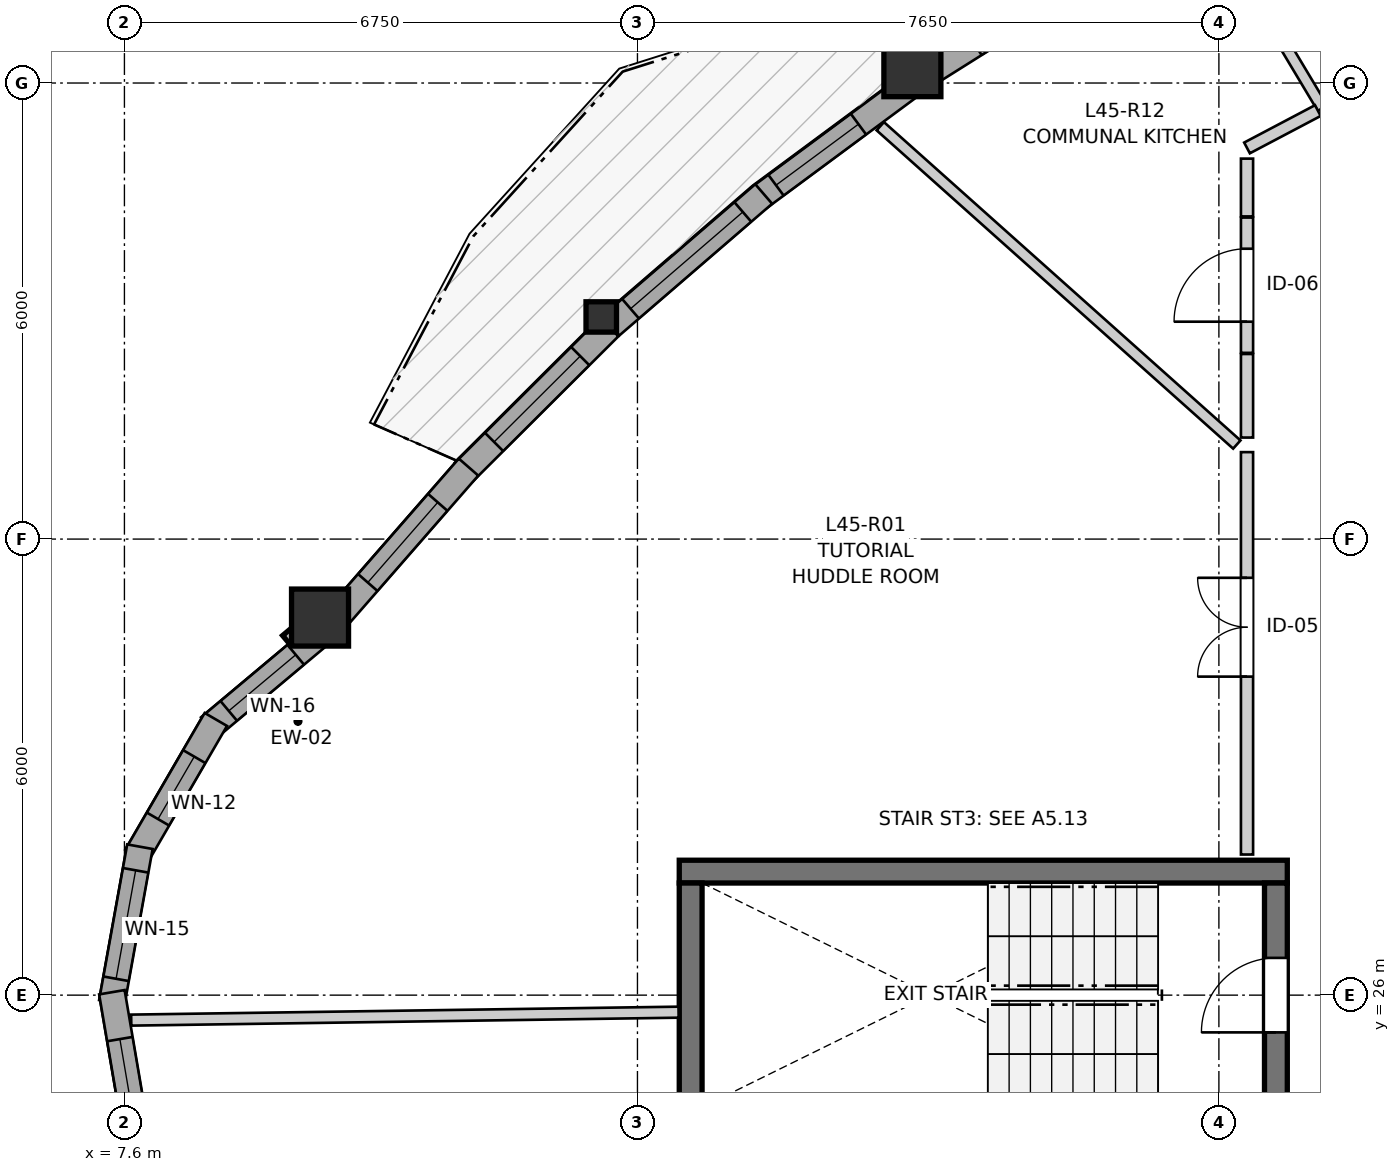
"""IFC4 building model, lengths in metres.
Left out: names, types, materials, properties, quantities, classifications, styles, units other than length and angle.
Written with IfcOpenShell. Run it as: python <this file> out.ifc"""

import sys

from ifc_helpers import new_model, si_unit, direction, frame, frame_2d, origin, origin_2d, place, context, subcontext, project, spatial, rectangle, i_section, extrude, source, transform, mapped, element, fill, save


model = new_model("IFC4")
c1 = context("Model", 3, precision=1e-05, world=origin(), true_north=direction((0.0, 1.0)))
c2 = subcontext(c1, "Body", "Model", "MODEL_VIEW")
j1 = project(units=[si_unit("LENGTHUNIT", "METRE"), si_unit("PLANEANGLEUNIT", "RADIAN")], contexts=[c1])
p1 = place(None, origin())
s1 = spatial("IfcSite", under=j1, at=p1, CompositionType="ELEMENT")
p2 = place(p1, origin())
s2 = spatial("IfcBuilding", under=s1, at=p2, CompositionType="ELEMENT")
p3 = place(p2, frame((0.0, 0.0, 152.2)))
s3 = spatial("IfcBuildingStorey", under=s2, at=p3, CompositionType="ELEMENT", Elevation=152.2)
p4 = place(p3, frame((22.9, 27.625, 0.0), z_axis=(0.0, 0.0, 1.0), x_axis=(-1.0, 0.0, 0.0)))
e1 = element("IfcWall", 1, at=p4, inside=s3, PredefinedType="SHEAR", context=c2, shape_type="SweptSolid", body=[
    extrude(rectangle(XDim=8.0, YDim=0.3, at=frame_2d((4.0, 0.0))), origin(), (0.0, 0.0, 1.0), 2.935),
])
p5 = place(p3, frame((15.05, 27.475, 0.0), z_axis=(0.0, 0.0, 1.0), x_axis=(0.0, -1.0, 0.0)))
e2 = element("IfcWall", 2, at=p5, inside=s3, PredefinedType="SHEAR", context=c2, shape_type="SweptSolid", body=[
    extrude(rectangle(XDim=2.95, YDim=0.3, at=frame_2d((1.475, 0.0))), origin(), (0.0, 0.0, 1.0), 2.935),
])
p6 = place(p3, frame((22.75, 24.525, 0.0), z_axis=(0.0, 0.0, 1.0), x_axis=(0.0, 1.0, 0.0)))
e3 = element("IfcWall", 3, at=p6, inside=s3, PredefinedType="SHEAR", context=c2, shape_type="SweptSolid", body=[
    extrude(rectangle(XDim=2.95, YDim=0.3, at=frame_2d((1.475, 0.0))), origin(), (0.0, 0.0, 1.0), 2.935),
])
p7 = place(p6, frame((0.985, 0.0, 0.0)))
e4 = element("IfcOpeningElement", 4, at=p7, cuts=e3, PredefinedType="OPENING", context=c2, shape_type="SweptSolid", body=[
    extrude(rectangle(XDim=0.98, YDim=2.15, at=frame_2d((0.49, 1.075))), frame((0.0, 0.16, 0.0), z_axis=(0.0, -1.0, 0.0), x_axis=(1.0, 0.0, 0.0)), (0.0, 0.0, 1.0), 0.32),
])
m1 = source(origin(), c2, "Body", "SweptSolid", [
    extrude(rectangle(XDim=0.75, YDim=0.75, at=origin_2d()), origin(), (0.0, 0.0, 1.0), 2.935),
])
for number, where, z_axis, x_axis in (
    (5, (10.174, 30.967, 0.0), (0.0, 0.0, 1.0), (1.0, 0.0, 0.0)),
    (6, (17.967, 38.195, 0.0), (0.0, 0.0, 1.0), (1.0, 0.0, 0.0)),
):
    element("IfcColumn", number, at=place(p3, frame(where, z_axis=z_axis, x_axis=x_axis)), inside=s3, PredefinedType="COLUMN", context=c2, shape_type="MappedRepresentation", body=[
        mapped(m1, transform((0.0, 0.0, 0.0), x_axis=(1.0, 0.0, 0.0), y_axis=(0.0, 1.0, 0.0), z_axis=(0.0, 0.0, 1.0), scale=1.0)),
    ])
m2 = source(origin(), c2, "Body", "SweptSolid", [
    extrude(i_section(OverallWidth=0.401, OverallDepth=0.399, WebThickness=0.023, FlangeThickness=0.036, FilletRadius=0.015, at=origin_2d()), origin(), (0.0, 0.0, 1.0), 2.935),
])
p8 = place(p3, frame((13.874, 34.922, 0.0), z_axis=(0.0, 0.0, 1.0), x_axis=(1.0, 0.0, 0.0)))
e7 = element("IfcColumn", 7, at=p8, inside=s3, PredefinedType="PILASTER", context=c2, shape_type="MappedRepresentation", body=[
    mapped(m2, transform((0.0, 0.0, 0.0), x_axis=(1.0, 0.0, 0.0), y_axis=(0.0, 1.0, 0.0), z_axis=(0.0, 0.0, 1.0), scale=1.0)),
])
p9 = place(p3, frame((10.164, 30.738, 0.0), z_axis=(0.0, 0.0, 1.0), x_axis=(-0.766501557267, -0.64224244854, 0.0)))
e8 = element("IfcWall", 8, at=p9, inside=s3, PredefinedType="SOLIDWALL", context=c2, shape_type="SweptSolid", body=[
    extrude(rectangle(XDim=1.888, YDim=0.34, at=frame_2d((0.944, 0.0))), origin(), (0.0, 0.0, 1.0), 2.515),
])
p10 = place(p9, frame((0.404, 0.0, 0.82)))
e9 = element("IfcOpeningElement", 9, at=p10, cuts=e8, PredefinedType="OPENING", context=c2, shape_type="SweptSolid", body=[
    extrude(rectangle(XDim=1.15, YDim=1.2, at=frame_2d((0.575, 0.6))), frame((0.0, 0.18, 0.0), z_axis=(0.0, -1.0, 0.0), x_axis=(1.0, 0.0, 0.0)), (0.0, 0.0, 1.0), 0.36),
])
p11 = place(p3, frame((8.803, 29.627, 0.0), z_axis=(0.0, 0.0, 1.0), x_axis=(-0.502090235641, -0.864815237651, 0.0)))
e10 = element("IfcWall", 10, at=p11, inside=s3, PredefinedType="SOLIDWALL", context=c2, shape_type="SweptSolid", body=[
    extrude(rectangle(XDim=2.081, YDim=0.34, at=frame_2d((1.041, 0.0))), origin(), (0.0, 0.0, 1.0), 2.515),
])
p12 = place(p11, frame((0.565, 0.0, 0.82)))
e11 = element("IfcOpeningElement", 11, at=p12, cuts=e10, PredefinedType="OPENING", context=c2, shape_type="SweptSolid", body=[
    extrude(rectangle(XDim=0.95, YDim=1.35, at=frame_2d((0.475, 0.675))), frame((0.0, 0.18, 0.0), z_axis=(0.0, -1.0, 0.0), x_axis=(1.0, 0.0, 0.0)), (0.0, 0.0, 1.0), 0.36),
])
p13 = place(p3, frame((7.804, 27.953, 0.0), z_axis=(0.0, 0.0, 1.0), x_axis=(-0.177605215389, -0.984101817632, 0.0)))
e12 = element("IfcWall", 12, at=p13, inside=s3, PredefinedType="SOLIDWALL", context=c2, shape_type="SweptSolid", body=[
    extrude(rectangle(XDim=2.081, YDim=0.34, at=frame_2d((1.041, 0.0))), origin(), (0.0, 0.0, 1.0), 2.515),
])
p14 = place(p13, frame((0.316, 0.0, 0.82)))
e13 = element("IfcOpeningElement", 13, at=p14, cuts=e12, PredefinedType="OPENING", context=c2, shape_type="SweptSolid", body=[
    extrude(rectangle(XDim=1.45, YDim=1.25, at=frame_2d((0.725, 0.625))), frame((0.0, 0.18, 0.0), z_axis=(0.0, -1.0, 0.0), x_axis=(1.0, 0.0, 0.0)), (0.0, 0.0, 1.0), 0.36),
])
p15 = place(p3, frame((7.435, 26.038, 0.0), z_axis=(0.0, 0.0, 1.0), x_axis=(0.168107405166, -0.985768685001, 0.0)))
e14 = element("IfcWall", 14, at=p15, inside=s3, PredefinedType="SOLIDWALL", context=c2, shape_type="SweptSolid", body=[
    extrude(rectangle(XDim=2.081, YDim=0.34, at=frame_2d((1.041, 0.0))), origin(), (0.0, 0.0, 1.0), 2.515),
])
p16 = place(p15, frame((0.625, 0.0, 0.82)))
e15 = element("IfcOpeningElement", 15, at=p16, cuts=e14, PredefinedType="OPENING", context=c2, shape_type="SweptSolid", body=[
    extrude(rectangle(XDim=1.15, YDim=1.2, at=frame_2d((0.575, 0.6))), frame((0.0, 0.18, 0.0), z_axis=(0.0, -1.0, 0.0), x_axis=(1.0, 0.0, 0.0)), (0.0, 0.0, 1.0), 0.36),
])
p17 = place(p3, frame((20.284, 39.452, 0.0), z_axis=(0.0, 0.0, 1.0), x_axis=(-0.846415587119, -0.532522913951, 0.0)))
e16 = element("IfcWall", 16, at=p17, inside=s3, PredefinedType="SOLIDWALL", context=c2, shape_type="SweptSolid", body=[
    extrude(rectangle(XDim=2.476, YDim=0.34, at=frame_2d((1.238, 0.0))), origin(), (0.0, 0.0, 1.0), 2.515),
])
p18 = place(p17, frame((0.718, 0.0, 0.82)))
e17 = element("IfcOpeningElement", 17, at=p18, cuts=e16, PredefinedType="OPENING", context=c2, shape_type="SweptSolid", body=[
    extrude(rectangle(XDim=1.05, YDim=1.45, at=frame_2d((0.525, 0.725))), frame((0.0, 0.18, 0.0), z_axis=(0.0, -1.0, 0.0), x_axis=(1.0, 0.0, 0.0)), (0.0, 0.0, 1.0), 0.36),
])
p19 = place(p3, frame((17.944, 37.967, 0.0), z_axis=(0.0, 0.0, 1.0), x_axis=(-0.803795025682, -0.594906342788, 0.0)))
e18 = element("IfcWall", 18, at=p19, inside=s3, PredefinedType="SOLIDWALL", context=c2, shape_type="SweptSolid", body=[
    extrude(rectangle(XDim=2.491, YDim=0.34, at=frame_2d((1.245, 0.0))), origin(), (0.0, 0.0, 1.0), 2.515),
])
p20 = place(p19, frame((0.853, 0.0, 0.82)))
e19 = element("IfcOpeningElement", 19, at=p20, cuts=e18, PredefinedType="OPENING", context=c2, shape_type="SweptSolid", body=[
    extrude(rectangle(XDim=1.35, YDim=1.45, at=frame_2d((0.675, 0.725))), frame((0.0, 0.18, 0.0), z_axis=(0.0, -1.0, 0.0), x_axis=(1.0, 0.0, 0.0)), (0.0, 0.0, 1.0), 0.36),
])
p21 = place(p3, frame((16.011, 36.54, 0.0), z_axis=(0.0, 0.0, 1.0), x_axis=(-0.757442887734, -0.652901425807, 0.0)))
e20 = element("IfcWall", 20, at=p21, inside=s3, PredefinedType="SOLIDWALL", context=c2, shape_type="SweptSolid", body=[
    extrude(rectangle(XDim=2.655, YDim=0.34, at=frame_2d((1.328, 0.0))), origin(), (0.0, 0.0, 1.0), 2.515),
])
p22 = place(p21, frame((0.363, 0.0, 0.82)))
e21 = element("IfcOpeningElement", 21, at=p22, cuts=e20, PredefinedType="OPENING", context=c2, shape_type="SweptSolid", body=[
    extrude(rectangle(XDim=1.95, YDim=1.4, at=frame_2d((0.975, 0.7))), frame((0.0, 0.18, 0.0), z_axis=(0.0, -1.0, 0.0), x_axis=(1.0, 0.0, 0.0)), (0.0, 0.0, 1.0), 0.36),
])
p23 = place(p3, frame((13.979, 34.788, 0.0), z_axis=(0.0, 0.0, 1.0), x_axis=(-0.708417113386, -0.705794016312, 0.0)))
e22 = element("IfcWall", 22, at=p23, inside=s3, PredefinedType="SOLIDWALL", context=c2, shape_type="SweptSolid", body=[
    extrude(rectangle(XDim=2.699, YDim=0.34, at=frame_2d((1.35, 0.0))), origin(), (0.0, 0.0, 1.0), 2.515),
])
p24 = place(p23, frame((0.54, 0.0, 0.82)))
e23 = element("IfcOpeningElement", 23, at=p24, cuts=e22, PredefinedType="OPENING", context=c2, shape_type="SweptSolid", body=[
    extrude(rectangle(XDim=1.6, YDim=1.35, at=frame_2d((0.8, 0.675))), frame((0.0, 0.18, 0.0), z_axis=(0.0, -1.0, 0.0), x_axis=(1.0, 0.0, 0.0)), (0.0, 0.0, 1.0), 0.36),
])
p25 = place(p3, frame((12.127, 32.947, 0.0), z_axis=(0.0, 0.0, 1.0), x_axis=(-0.657607305641, -0.753360890655, 0.0)))
e24 = element("IfcWall", 24, at=p25, inside=s3, PredefinedType="SOLIDWALL", context=c2, shape_type="SweptSolid", body=[
    extrude(rectangle(XDim=2.621, YDim=0.34, at=frame_2d((1.311, 0.0))), origin(), (0.0, 0.0, 1.0), 2.515),
])
p26 = place(p25, frame((0.615, 0.0, 0.82)))
e25 = element("IfcOpeningElement", 25, at=p26, cuts=e24, PredefinedType="OPENING", context=c2, shape_type="SweptSolid", body=[
    extrude(rectangle(XDim=1.4, YDim=1.35, at=frame_2d((0.7, 0.675))), frame((0.0, 0.18, 0.0), z_axis=(0.0, -1.0, 0.0), x_axis=(1.0, 0.0, 0.0)), (0.0, 0.0, 1.0), 0.36),
])
p27 = place(p3, frame((22.37, 27.85, 0.0), z_axis=(0.0, 0.0, 1.0), x_axis=(0.0, 1.0, 0.0)))
e26 = element("IfcWall", 26, at=p27, inside=s3, PredefinedType="PARTITIONING", context=c2, shape_type="SweptSolid", body=[
    extrude(rectangle(XDim=5.294, YDim=0.16, at=frame_2d((2.647, 0.0))), origin(), (0.0, 0.0, 1.0), 2.935),
])
p28 = place(p27, frame((2.341, 0.0, 0.0)))
e27 = element("IfcOpeningElement", 27, at=p28, cuts=e26, PredefinedType="OPENING", context=c2, shape_type="SweptSolid", body=[
    extrude(rectangle(XDim=1.3, YDim=2.1, at=frame_2d((0.65, 1.05))), frame((0.0, 0.09, 0.0), z_axis=(0.0, -1.0, 0.0), x_axis=(1.0, 0.0, 0.0)), (0.0, 0.0, 1.0), 0.18),
])
p29 = place(p3, frame((22.37, 34.45, 0.0), z_axis=(0.0, 0.0, 1.0), x_axis=(0.0, 1.0, 0.0)))
e28 = element("IfcWall", 28, at=p29, inside=s3, PredefinedType="PARTITIONING", context=c2, shape_type="SweptSolid", body=[
    extrude(rectangle(XDim=1.78, YDim=0.16, at=frame_2d((0.89, 0.0))), origin(), (0.0, 0.0, 1.0), 2.935),
])
p30 = place(p29, frame((0.41, 0.0, 0.0)))
e29 = element("IfcOpeningElement", 29, at=p30, cuts=e28, PredefinedType="OPENING", context=c2, shape_type="SweptSolid", body=[
    extrude(rectangle(XDim=0.96, YDim=2.1, at=frame_2d((0.48, 1.05))), frame((0.0, 0.09, 0.0), z_axis=(0.0, -1.0, 0.0), x_axis=(1.0, 0.0, 0.0)), (0.0, 0.0, 1.0), 0.18),
])
p31 = place(p3, frame((7.689, 25.671, 0.0), z_axis=(0.0, 0.0, 1.0), x_axis=(0.999894747293, 0.014508422953, 0.0)))
e30 = element("IfcWall", 30, at=p31, inside=s3, PredefinedType="PARTITIONING", context=c2, shape_type="SweptSolid", body=[
    extrude(rectangle(XDim=7.202, YDim=0.145, at=frame_2d((3.601, 0.0))), origin(), (0.0, 0.0, 1.0), 2.935),
])
p32 = place(p3, frame((17.545, 37.432, 0.0), z_axis=(0.0, 0.0, 1.0), x_axis=(0.745965905636, -0.665984134668, 0.0)))
e31 = element("IfcWall", 31, at=p32, inside=s3, PredefinedType="PARTITIONING", context=c2, shape_type="SweptSolid", body=[
    extrude(rectangle(XDim=6.288, YDim=0.145, at=frame_2d((3.144, 0.0))), origin(), (0.0, 0.0, 1.0), 2.935),
])
p33 = place(p3, frame((21.908, 40.1, 0.0), z_axis=(0.0, 0.0, 1.0), x_axis=(0.513582752497, -0.85804006686, 0.0)))
e32 = element("IfcWall", 32, at=p33, inside=s3, PredefinedType="PARTITIONING", context=c2, shape_type="SweptSolid", body=[
    extrude(rectangle(XDim=2.832, YDim=0.145, at=frame_2d((1.416, 0.0))), origin(), (0.0, 0.0, 1.0), 2.935),
])
p34 = place(p3, frame((22.37, 33.336, 0.0), z_axis=(0.0, 0.0, 1.0), x_axis=(0.0, 1.0, 0.0)))
e33 = element("IfcWall", 33, at=p34, inside=s3, PredefinedType="PARTITIONING", context=c2, shape_type="SweptSolid", body=[
    extrude(rectangle(XDim=1.099, YDim=0.16, at=frame_2d((0.55, 0.0))), origin(), (0.0, 0.0, 1.0), 2.935),
])
p35 = place(p3, frame((22.37, 37.146, 0.0), z_axis=(0.0, 0.0, 1.0), x_axis=(0.884530854714, 0.46648168995, 0.0)))
e34 = element("IfcWall", 34, at=p35, inside=s3, PredefinedType="PARTITIONING", context=c2, shape_type="SweptSolid", body=[
    extrude(rectangle(XDim=1.053, YDim=0.16, at=frame_2d((0.527, 0.0))), origin(), (0.0, 0.0, 1.0), 2.543),
])
p36 = place(p3, frame((22.37, 36.245, 0.0), z_axis=(0.0, 0.0, 1.0), x_axis=(0.0, 1.0, 0.0)))
e35 = element("IfcWall", 35, at=p36, inside=s3, PredefinedType="PARTITIONING", context=c2, shape_type="SweptSolid", body=[
    extrude(rectangle(XDim=0.76, YDim=0.16, at=frame_2d((0.38, 0.0))), origin(), (0.0, 0.0, 1.0), 2.935),
])
m3 = source(origin(), c2, "Body", "SweptSolid", [
    extrude(rectangle(XDim=1.15, YDim=1.2, at=frame_2d((0.575, 0.6))), frame((0.0, 0.03, 0.0), z_axis=(0.0, -1.0, 0.0), x_axis=(1.0, 0.0, 0.0)), (0.0, 0.0, 1.0), 0.06),
])
p37 = place(p10, origin())
e36 = element("IfcWindow", 36, at=p37, inside=s3, PartitioningType="SINGLE_PANEL", PredefinedType="WINDOW", context=c2, shape_type="MappedRepresentation", body=[
    mapped(m3, transform((0.0, 0.0, 0.0), x_axis=(1.0, 0.0, 0.0), y_axis=(0.0, 1.0, 0.0), z_axis=(0.0, 0.0, 1.0), scale=1.0)),
])
fill(e9, e36)
m4 = source(origin(), c2, "Body", "SweptSolid", [
    extrude(rectangle(XDim=0.95, YDim=1.35, at=frame_2d((0.475, 0.675))), frame((0.0, 0.03, 0.0), z_axis=(0.0, -1.0, 0.0), x_axis=(1.0, 0.0, 0.0)), (0.0, 0.0, 1.0), 0.06),
])
p38 = place(p12, origin())
e37 = element("IfcWindow", 37, at=p38, inside=s3, PartitioningType="SINGLE_PANEL", PredefinedType="WINDOW", context=c2, shape_type="MappedRepresentation", body=[
    mapped(m4, transform((0.0, 0.0, 0.0), x_axis=(1.0, 0.0, 0.0), y_axis=(0.0, 1.0, 0.0), z_axis=(0.0, 0.0, 1.0), scale=1.0)),
])
fill(e11, e37)
m5 = source(origin(), c2, "Body", "SweptSolid", [
    extrude(rectangle(XDim=1.45, YDim=1.25, at=frame_2d((0.725, 0.625))), frame((0.0, 0.03, 0.0), z_axis=(0.0, -1.0, 0.0), x_axis=(1.0, 0.0, 0.0)), (0.0, 0.0, 1.0), 0.06),
])
p39 = place(p14, origin())
e38 = element("IfcWindow", 38, at=p39, inside=s3, PartitioningType="SINGLE_PANEL", PredefinedType="WINDOW", context=c2, shape_type="MappedRepresentation", body=[
    mapped(m5, transform((0.0, 0.0, 0.0), x_axis=(1.0, 0.0, 0.0), y_axis=(0.0, 1.0, 0.0), z_axis=(0.0, 0.0, 1.0), scale=1.0)),
])
fill(e13, e38)
p40 = place(p16, origin())
e39 = element("IfcWindow", 39, at=p40, inside=s3, PartitioningType="SINGLE_PANEL", PredefinedType="WINDOW", context=c2, shape_type="MappedRepresentation", body=[
    mapped(m3, transform((0.0, 0.0, 0.0), x_axis=(1.0, 0.0, 0.0), y_axis=(0.0, 1.0, 0.0), z_axis=(0.0, 0.0, 1.0), scale=1.0)),
])
fill(e15, e39)
m6 = source(origin(), c2, "Body", "SweptSolid", [
    extrude(rectangle(XDim=1.35, YDim=1.45, at=frame_2d((0.675, 0.725))), frame((0.0, 0.03, 0.0), z_axis=(0.0, -1.0, 0.0), x_axis=(1.0, 0.0, 0.0)), (0.0, 0.0, 1.0), 0.06),
])
p41 = place(p20, origin())
e40 = element("IfcWindow", 40, at=p41, inside=s3, PartitioningType="SINGLE_PANEL", PredefinedType="WINDOW", context=c2, shape_type="MappedRepresentation", body=[
    mapped(m6, transform((0.0, 0.0, 0.0), x_axis=(1.0, 0.0, 0.0), y_axis=(0.0, 1.0, 0.0), z_axis=(0.0, 0.0, 1.0), scale=1.0)),
])
fill(e19, e40)
m7 = source(origin(), c2, "Body", "SweptSolid", [
    extrude(rectangle(XDim=1.95, YDim=1.4, at=frame_2d((0.975, 0.7))), frame((0.0, 0.03, 0.0), z_axis=(0.0, -1.0, 0.0), x_axis=(1.0, 0.0, 0.0)), (0.0, 0.0, 1.0), 0.06),
])
p42 = place(p22, origin())
e41 = element("IfcWindow", 41, at=p42, inside=s3, PartitioningType="SINGLE_PANEL", PredefinedType="WINDOW", context=c2, shape_type="MappedRepresentation", body=[
    mapped(m7, transform((0.0, 0.0, 0.0), x_axis=(1.0, 0.0, 0.0), y_axis=(0.0, 1.0, 0.0), z_axis=(0.0, 0.0, 1.0), scale=1.0)),
])
fill(e21, e41)
m8 = source(origin(), c2, "Body", "SweptSolid", [
    extrude(rectangle(XDim=1.6, YDim=1.35, at=frame_2d((0.8, 0.675))), frame((0.0, 0.03, 0.0), z_axis=(0.0, -1.0, 0.0), x_axis=(1.0, 0.0, 0.0)), (0.0, 0.0, 1.0), 0.06),
])
p43 = place(p24, origin())
e42 = element("IfcWindow", 42, at=p43, inside=s3, PartitioningType="SINGLE_PANEL", PredefinedType="WINDOW", context=c2, shape_type="MappedRepresentation", body=[
    mapped(m8, transform((0.0, 0.0, 0.0), x_axis=(1.0, 0.0, 0.0), y_axis=(0.0, 1.0, 0.0), z_axis=(0.0, 0.0, 1.0), scale=1.0)),
])
fill(e23, e42)
m9 = source(origin(), c2, "Body", "SweptSolid", [
    extrude(rectangle(XDim=1.4, YDim=1.35, at=frame_2d((0.7, 0.675))), frame((0.0, 0.03, 0.0), z_axis=(0.0, -1.0, 0.0), x_axis=(1.0, 0.0, 0.0)), (0.0, 0.0, 1.0), 0.06),
])
p44 = place(p26, origin())
e43 = element("IfcWindow", 43, at=p44, inside=s3, PartitioningType="SINGLE_PANEL", PredefinedType="WINDOW", context=c2, shape_type="MappedRepresentation", body=[
    mapped(m9, transform((0.0, 0.0, 0.0), x_axis=(1.0, 0.0, 0.0), y_axis=(0.0, 1.0, 0.0), z_axis=(0.0, 0.0, 1.0), scale=1.0)),
])
fill(e25, e43)
m10 = source(origin(), c2, "Body", "SweptSolid", [
    extrude(rectangle(XDim=0.98, YDim=2.15, at=frame_2d((0.49, 1.075))), frame((0.0, 0.025, 0.0), z_axis=(0.0, -1.0, 0.0), x_axis=(1.0, 0.0, 0.0)), (0.0, 0.0, 1.0), 0.05),
])
p45 = place(p7, origin())
e44 = element("IfcDoor", 44, at=p45, inside=s3, OperationType="SINGLE_SWING_LEFT", PredefinedType="DOOR", context=c2, shape_type="MappedRepresentation", body=[
    mapped(m10, transform((0.0, 0.0, 0.0), x_axis=(1.0, 0.0, 0.0), y_axis=(0.0, 1.0, 0.0), z_axis=(0.0, 0.0, 1.0), scale=1.0)),
])
fill(e4, e44)
m11 = source(origin(), c2, "Body", "SweptSolid", [
    extrude(rectangle(XDim=1.3, YDim=2.1, at=frame_2d((0.65, 1.05))), frame((0.0, 0.025, 0.0), z_axis=(0.0, -1.0, 0.0), x_axis=(1.0, 0.0, 0.0)), (0.0, 0.0, 1.0), 0.05),
])
p46 = place(p28, origin())
e45 = element("IfcDoor", 45, at=p46, inside=s3, OperationType="DOUBLE_DOOR_SINGLE_SWING", PredefinedType="DOOR", context=c2, shape_type="MappedRepresentation", body=[
    mapped(m11, transform((0.0, 0.0, 0.0), x_axis=(1.0, 0.0, 0.0), y_axis=(0.0, 1.0, 0.0), z_axis=(0.0, 0.0, 1.0), scale=1.0)),
])
fill(e27, e45)
m12 = source(origin(), c2, "Body", "SweptSolid", [
    extrude(rectangle(XDim=0.96, YDim=2.1, at=frame_2d((0.48, 1.05))), frame((0.0, 0.025, 0.0), z_axis=(0.0, -1.0, 0.0), x_axis=(1.0, 0.0, 0.0)), (0.0, 0.0, 1.0), 0.05),
])
p47 = place(p30, origin())
e46 = element("IfcDoor", 46, at=p47, inside=s3, OperationType="SINGLE_SWING_LEFT", PredefinedType="DOOR", context=c2, shape_type="MappedRepresentation", body=[
    mapped(m12, transform((0.0, 0.0, 0.0), x_axis=(1.0, 0.0, 0.0), y_axis=(0.0, 1.0, 0.0), z_axis=(0.0, 0.0, 1.0), scale=1.0)),
])
fill(e29, e46)
save(model, sys.argv[1])
